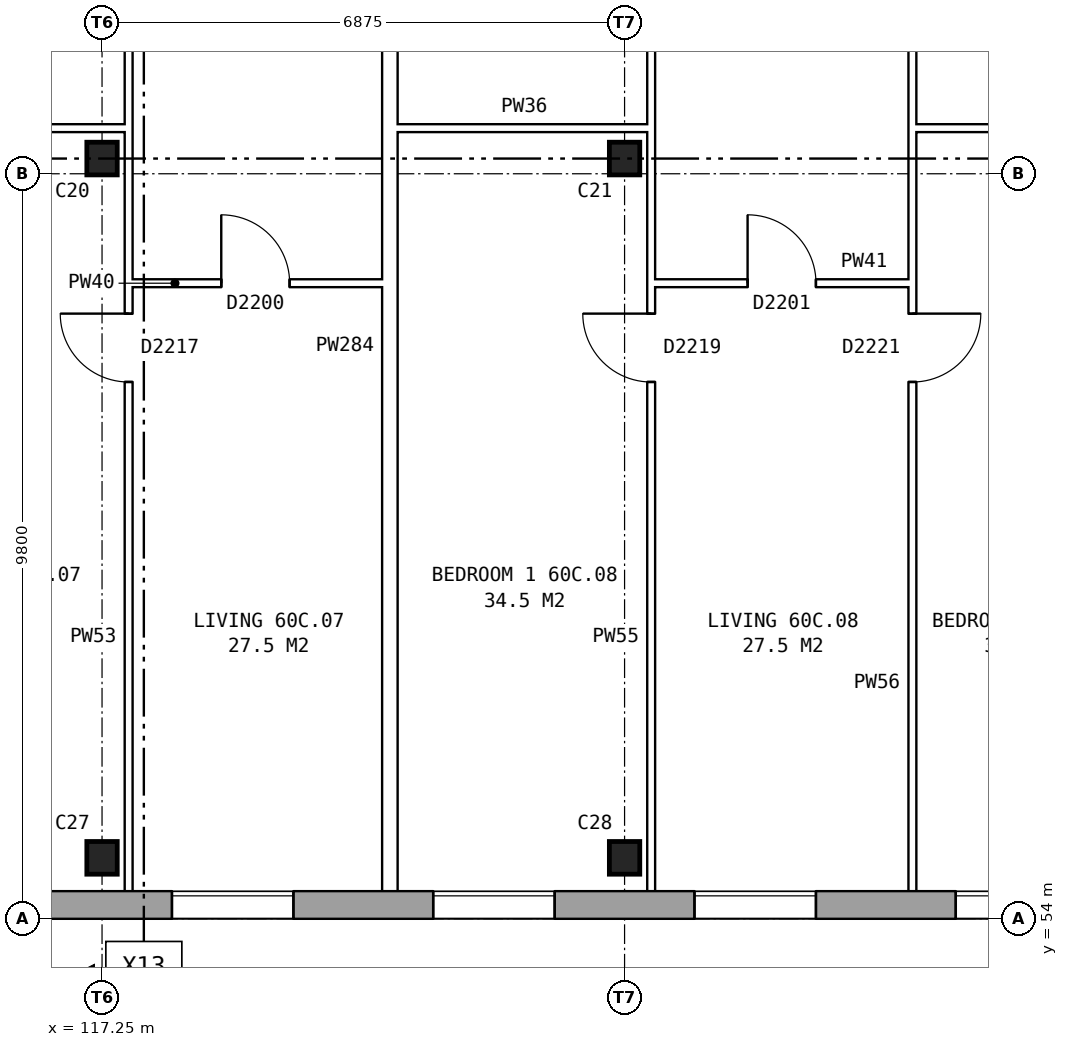
"""IFC4 building model, lengths in metres.
Left out: names, types, materials, properties, quantities, classifications, styles, units other than length and angle.
Written with IfcOpenShell. Run it as: python <this file> out.ifc"""

import sys

from ifc_helpers import new_model, si_unit, direction, frame, frame_2d, origin, origin_2d, place, context, subcontext, project, spatial, rectangle, i_section, extrude, element, fill, save


model = new_model("IFC4")
c1 = context("Model", 3, precision=1e-05, world=origin(), true_north=direction((0.0, 1.0)))
c2 = subcontext(c1, "Body", "Model", "MODEL_VIEW")
j1 = project(units=[si_unit("LENGTHUNIT", "METRE"), si_unit("PLANEANGLEUNIT", "RADIAN")], contexts=[c1])
p1 = place(None, origin())
s1 = spatial("IfcSite", under=j1, at=p1, CompositionType="ELEMENT")
p2 = place(p1, origin())
s2 = spatial("IfcBuilding", under=s1, at=p2, CompositionType="ELEMENT")
p3 = place(p2, frame((0.0, 0.0, 212.1)))
s3 = spatial("IfcBuildingStorey", under=s2, at=p3, CompositionType="ELEMENT", Elevation=212.1)
for number, where, z_axis, x_axis in (
    (1, (117.25, 54.8, 0.0), (0.0, 0.0, 1.0), (1.0, 0.0, 0.0)),
    (2, (124.125, 54.8, 0.0), (0.0, 0.0, 1.0), (1.0, 0.0, 0.0)),
    (3, (117.25, 64.0, 0.0), (0.0, 0.0, 1.0), (1.0, 0.0, 0.0)),
    (4, (124.125, 64.0, 0.0), (0.0, 0.0, 1.0), (1.0, 0.0, 0.0)),
):
    element("IfcColumn", number, at=place(p3, frame(where, z_axis=z_axis, x_axis=x_axis)), inside=s3, PredefinedType="COLUMN", context=c2, shape_type="SweptSolid", body=[
        extrude(i_section(OverallWidth=0.4, OverallDepth=0.43, WebThickness=0.04, FlangeThickness=0.04, at=origin_2d()), origin(), (0.0, 0.0, 1.0), 2.85),
    ])
p4 = place(p3, frame((75.95, 54.18, 0.0), z_axis=(0.0, 0.0, 1.0), x_axis=(1.0, 0.0, 0.0)))
e5 = element("IfcWall", 5, at=p4, inside=s3, PredefinedType="STANDARD", context=c2, shape_type="SweptSolid", body=[
    extrude(rectangle(XDim=55.1, YDim=0.36, at=frame_2d((27.55, 0.0))), origin(), (0.0, 0.0, 1.0), 2.85),
])
p5 = place(p4, frame((0.969, 0.0, 0.8)))
e6 = element("IfcOpeningElement", 6, at=p5, cuts=e5, PredefinedType="OPENING", context=c2, shape_type="SweptSolid", body=[
    extrude(rectangle(XDim=1.6, YDim=1.8, at=frame_2d((0.8, 0.9))), frame((0.0, 0.19, 0.0), z_axis=(0.0, -1.0, 0.0), x_axis=(1.0, 0.0, 0.0)), (0.0, 0.0, 1.0), 0.38),
])
p6 = place(p4, frame((4.406, 0.0, 0.8)))
e7 = element("IfcOpeningElement", 7, at=p6, cuts=e5, PredefinedType="OPENING", context=c2, shape_type="SweptSolid", body=[
    extrude(rectangle(XDim=1.6, YDim=1.8, at=frame_2d((0.8, 0.9))), frame((0.0, 0.19, 0.0), z_axis=(0.0, -1.0, 0.0), x_axis=(1.0, 0.0, 0.0)), (0.0, 0.0, 1.0), 0.38),
])
p7 = place(p4, frame((7.844, 0.0, 0.8)))
e8 = element("IfcOpeningElement", 8, at=p7, cuts=e5, PredefinedType="OPENING", context=c2, shape_type="SweptSolid", body=[
    extrude(rectangle(XDim=1.6, YDim=1.8, at=frame_2d((0.8, 0.9))), frame((0.0, 0.19, 0.0), z_axis=(0.0, -1.0, 0.0), x_axis=(1.0, 0.0, 0.0)), (0.0, 0.0, 1.0), 0.38),
])
p8 = place(p4, frame((11.281, 0.0, 0.8)))
e9 = element("IfcOpeningElement", 9, at=p8, cuts=e5, PredefinedType="OPENING", context=c2, shape_type="SweptSolid", body=[
    extrude(rectangle(XDim=1.6, YDim=1.8, at=frame_2d((0.8, 0.9))), frame((0.0, 0.19, 0.0), z_axis=(0.0, -1.0, 0.0), x_axis=(1.0, 0.0, 0.0)), (0.0, 0.0, 1.0), 0.38),
])
p9 = place(p4, frame((14.719, 0.0, 0.8)))
e10 = element("IfcOpeningElement", 10, at=p9, cuts=e5, PredefinedType="OPENING", context=c2, shape_type="SweptSolid", body=[
    extrude(rectangle(XDim=1.6, YDim=1.8, at=frame_2d((0.8, 0.9))), frame((0.0, 0.19, 0.0), z_axis=(0.0, -1.0, 0.0), x_axis=(1.0, 0.0, 0.0)), (0.0, 0.0, 1.0), 0.38),
])
p10 = place(p4, frame((18.156, 0.0, 0.8)))
e11 = element("IfcOpeningElement", 11, at=p10, cuts=e5, PredefinedType="OPENING", context=c2, shape_type="SweptSolid", body=[
    extrude(rectangle(XDim=1.6, YDim=1.8, at=frame_2d((0.8, 0.9))), frame((0.0, 0.19, 0.0), z_axis=(0.0, -1.0, 0.0), x_axis=(1.0, 0.0, 0.0)), (0.0, 0.0, 1.0), 0.38),
])
p11 = place(p4, frame((21.594, 0.0, 0.8)))
e12 = element("IfcOpeningElement", 12, at=p11, cuts=e5, PredefinedType="OPENING", context=c2, shape_type="SweptSolid", body=[
    extrude(rectangle(XDim=1.6, YDim=1.8, at=frame_2d((0.8, 0.9))), frame((0.0, 0.19, 0.0), z_axis=(0.0, -1.0, 0.0), x_axis=(1.0, 0.0, 0.0)), (0.0, 0.0, 1.0), 0.38),
])
p12 = place(p4, frame((25.031, 0.0, 0.8)))
e13 = element("IfcOpeningElement", 13, at=p12, cuts=e5, PredefinedType="OPENING", context=c2, shape_type="SweptSolid", body=[
    extrude(rectangle(XDim=1.6, YDim=1.8, at=frame_2d((0.8, 0.9))), frame((0.0, 0.19, 0.0), z_axis=(0.0, -1.0, 0.0), x_axis=(1.0, 0.0, 0.0)), (0.0, 0.0, 1.0), 0.38),
])
p13 = place(p4, frame((28.469, 0.0, 0.8)))
e14 = element("IfcOpeningElement", 14, at=p13, cuts=e5, PredefinedType="OPENING", context=c2, shape_type="SweptSolid", body=[
    extrude(rectangle(XDim=1.6, YDim=1.8, at=frame_2d((0.8, 0.9))), frame((0.0, 0.19, 0.0), z_axis=(0.0, -1.0, 0.0), x_axis=(1.0, 0.0, 0.0)), (0.0, 0.0, 1.0), 0.38),
])
p14 = place(p4, frame((31.906, 0.0, 0.8)))
e15 = element("IfcOpeningElement", 15, at=p14, cuts=e5, PredefinedType="OPENING", context=c2, shape_type="SweptSolid", body=[
    extrude(rectangle(XDim=1.6, YDim=1.8, at=frame_2d((0.8, 0.9))), frame((0.0, 0.19, 0.0), z_axis=(0.0, -1.0, 0.0), x_axis=(1.0, 0.0, 0.0)), (0.0, 0.0, 1.0), 0.38),
])
p15 = place(p4, frame((35.344, 0.0, 0.8)))
e16 = element("IfcOpeningElement", 16, at=p15, cuts=e5, PredefinedType="OPENING", context=c2, shape_type="SweptSolid", body=[
    extrude(rectangle(XDim=1.6, YDim=1.8, at=frame_2d((0.8, 0.9))), frame((0.0, 0.19, 0.0), z_axis=(0.0, -1.0, 0.0), x_axis=(1.0, 0.0, 0.0)), (0.0, 0.0, 1.0), 0.38),
])
p16 = place(p4, frame((38.781, 0.0, 0.8)))
e17 = element("IfcOpeningElement", 17, at=p16, cuts=e5, PredefinedType="OPENING", context=c2, shape_type="SweptSolid", body=[
    extrude(rectangle(XDim=1.6, YDim=1.8, at=frame_2d((0.8, 0.9))), frame((0.0, 0.19, 0.0), z_axis=(0.0, -1.0, 0.0), x_axis=(1.0, 0.0, 0.0)), (0.0, 0.0, 1.0), 0.38),
])
p17 = place(p4, frame((42.219, 0.0, 0.8)))
e18 = element("IfcOpeningElement", 18, at=p17, cuts=e5, PredefinedType="OPENING", context=c2, shape_type="SweptSolid", body=[
    extrude(rectangle(XDim=1.6, YDim=1.8, at=frame_2d((0.8, 0.9))), frame((0.0, 0.19, 0.0), z_axis=(0.0, -1.0, 0.0), x_axis=(1.0, 0.0, 0.0)), (0.0, 0.0, 1.0), 0.38),
])
p18 = place(p4, frame((45.656, 0.0, 0.8)))
e19 = element("IfcOpeningElement", 19, at=p18, cuts=e5, PredefinedType="OPENING", context=c2, shape_type="SweptSolid", body=[
    extrude(rectangle(XDim=1.6, YDim=1.8, at=frame_2d((0.8, 0.9))), frame((0.0, 0.19, 0.0), z_axis=(0.0, -1.0, 0.0), x_axis=(1.0, 0.0, 0.0)), (0.0, 0.0, 1.0), 0.38),
])
p19 = place(p4, frame((49.094, 0.0, 0.8)))
e20 = element("IfcOpeningElement", 20, at=p19, cuts=e5, PredefinedType="OPENING", context=c2, shape_type="SweptSolid", body=[
    extrude(rectangle(XDim=1.6, YDim=1.8, at=frame_2d((0.8, 0.9))), frame((0.0, 0.19, 0.0), z_axis=(0.0, -1.0, 0.0), x_axis=(1.0, 0.0, 0.0)), (0.0, 0.0, 1.0), 0.38),
])
p20 = place(p4, frame((52.531, 0.0, 0.8)))
e21 = element("IfcOpeningElement", 21, at=p20, cuts=e5, PredefinedType="OPENING", context=c2, shape_type="SweptSolid", body=[
    extrude(rectangle(XDim=1.6, YDim=1.8, at=frame_2d((0.8, 0.9))), frame((0.0, 0.19, 0.0), z_axis=(0.0, -1.0, 0.0), x_axis=(1.0, 0.0, 0.0)), (0.0, 0.0, 1.0), 0.38),
])
p21 = place(p3, frame((117.6, 62.36, 0.0), z_axis=(0.0, 0.0, 1.0), x_axis=(1.0, 0.0, 0.0)))
e22 = element("IfcWall", 22, at=p21, inside=s3, PredefinedType="PARTITIONING", context=c2, shape_type="SweptSolid", body=[
    extrude(rectangle(XDim=3.337, YDim=0.1, at=frame_2d((1.668, 0.0))), origin(), (0.0, 0.0, 1.0), 2.85),
])
p22 = place(p21, frame((1.219, 0.0, 0.0)))
e23 = element("IfcOpeningElement", 23, at=p22, cuts=e22, PredefinedType="OPENING", context=c2, shape_type="SweptSolid", body=[
    extrude(rectangle(XDim=0.9, YDim=2.1, at=frame_2d((0.45, 1.05))), frame((0.0, 0.06, 0.0), z_axis=(0.0, -1.0, 0.0), x_axis=(1.0, 0.0, 0.0)), (0.0, 0.0, 1.0), 0.12),
])
p23 = place(p3, frame((124.475, 62.36, 0.0), z_axis=(0.0, 0.0, 1.0), x_axis=(1.0, 0.0, 0.0)))
e24 = element("IfcWall", 24, at=p23, inside=s3, PredefinedType="PARTITIONING", context=c2, shape_type="SweptSolid", body=[
    extrude(rectangle(XDim=3.437, YDim=0.1, at=frame_2d((1.719, 0.0))), origin(), (0.0, 0.0, 1.0), 2.85),
])
p24 = place(p23, frame((1.269, 0.0, 0.0)))
e25 = element("IfcOpeningElement", 25, at=p24, cuts=e24, PredefinedType="OPENING", context=c2, shape_type="SweptSolid", body=[
    extrude(rectangle(XDim=0.9, YDim=2.1, at=frame_2d((0.45, 1.05))), frame((0.0, 0.06, 0.0), z_axis=(0.0, -1.0, 0.0), x_axis=(1.0, 0.0, 0.0)), (0.0, 0.0, 1.0), 0.12),
])
for number, where, z_axis, x_axis in (
    (26, (114.262, 64.4, 0.0), (0.0, 0.0, 1.0), (1.0, 0.0, 0.0)),
    (27, (121.137, 64.4, 0.0), (0.0, 0.0, 1.0), (1.0, 0.0, 0.0)),
):
    element("IfcWall", number, at=place(p3, frame(where, z_axis=z_axis, x_axis=x_axis)), inside=s3, PredefinedType="PARTITIONING", context=c2, shape_type="SweptSolid", body=[
        extrude(rectangle(XDim=3.338, YDim=0.1, at=frame_2d((1.669, 0.0))), origin(), (0.0, 0.0, 1.0), 2.85),
    ])
p25 = place(p3, frame((127.912, 64.4, 0.0), z_axis=(0.0, 0.0, 1.0), x_axis=(1.0, 0.0, 0.0)))
e28 = element("IfcWall", 28, at=p25, inside=s3, PredefinedType="PARTITIONING", context=c2, shape_type="SweptSolid", body=[
    extrude(rectangle(XDim=3.448, YDim=0.1, at=frame_2d((1.724, 0.0))), origin(), (0.0, 0.0, 1.0), 2.85),
])
p26 = place(p3, frame((117.6, 54.36, 0.0), z_axis=(0.0, 0.0, 1.0), x_axis=(0.0, 1.0, 0.0)))
e29 = element("IfcWall", 29, at=p26, inside=s3, PredefinedType="PARTITIONING", context=c2, shape_type="SweptSolid", body=[
    extrude(rectangle(XDim=14.34, YDim=0.1, at=frame_2d((7.17, 0.0))), origin(), (0.0, 0.0, 1.0), 2.85),
])
p27 = place(p26, frame((6.7, 0.0, 0.0)))
e30 = element("IfcOpeningElement", 30, at=p27, cuts=e29, PredefinedType="OPENING", context=c2, shape_type="SweptSolid", body=[
    extrude(rectangle(XDim=0.9, YDim=2.1, at=frame_2d((0.45, 1.05))), frame((0.0, 0.06, 0.0), z_axis=(0.0, -1.0, 0.0), x_axis=(1.0, 0.0, 0.0)), (0.0, 0.0, 1.0), 0.12),
])
p28 = place(p26, frame((13.04, 0.0, 0.0)))
e31 = element("IfcOpeningElement", 31, at=p28, cuts=e29, PredefinedType="OPENING", context=c2, shape_type="SweptSolid", body=[
    extrude(rectangle(XDim=0.9, YDim=2.1, at=frame_2d((0.45, 1.05))), frame((0.0, 0.06, 0.0), z_axis=(0.0, -1.0, 0.0), x_axis=(1.0, 0.0, 0.0)), (0.0, 0.0, 1.0), 0.12),
])
p29 = place(p3, frame((121.037, 54.36, 0.0), z_axis=(0.0, 0.0, 1.0), x_axis=(0.0, 1.0, 0.0)))
e32 = element("IfcWall", 32, at=p29, inside=s3, PredefinedType="PARTITIONING", context=c2, shape_type="SweptSolid", body=[
    extrude(rectangle(XDim=14.34, YDim=0.2, at=frame_2d((7.17, 0.0))), origin(), (0.0, 0.0, 1.0), 2.85),
])
p30 = place(p3, frame((124.475, 54.36, 0.0), z_axis=(0.0, 0.0, 1.0), x_axis=(0.0, 1.0, 0.0)))
e33 = element("IfcWall", 33, at=p30, inside=s3, PredefinedType="PARTITIONING", context=c2, shape_type="SweptSolid", body=[
    extrude(rectangle(XDim=14.34, YDim=0.1, at=frame_2d((7.17, 0.0))), origin(), (0.0, 0.0, 1.0), 2.85),
])
p31 = place(p30, frame((6.7, 0.0, 0.0)))
e34 = element("IfcOpeningElement", 34, at=p31, cuts=e33, PredefinedType="OPENING", context=c2, shape_type="SweptSolid", body=[
    extrude(rectangle(XDim=0.9, YDim=2.1, at=frame_2d((0.45, 1.05))), frame((0.0, 0.06, 0.0), z_axis=(0.0, -1.0, 0.0), x_axis=(1.0, 0.0, 0.0)), (0.0, 0.0, 1.0), 0.12),
])
p32 = place(p30, frame((13.04, 0.0, 0.0)))
e35 = element("IfcOpeningElement", 35, at=p32, cuts=e33, PredefinedType="OPENING", context=c2, shape_type="SweptSolid", body=[
    extrude(rectangle(XDim=0.9, YDim=2.1, at=frame_2d((0.45, 1.05))), frame((0.0, 0.06, 0.0), z_axis=(0.0, -1.0, 0.0), x_axis=(1.0, 0.0, 0.0)), (0.0, 0.0, 1.0), 0.12),
])
p33 = place(p3, frame((127.912, 54.36, 0.0), z_axis=(0.0, 0.0, 1.0), x_axis=(0.0, 1.0, 0.0)))
e36 = element("IfcWall", 36, at=p33, inside=s3, PredefinedType="PARTITIONING", context=c2, shape_type="SweptSolid", body=[
    extrude(rectangle(XDim=14.34, YDim=0.1, at=frame_2d((7.17, 0.0))), origin(), (0.0, 0.0, 1.0), 2.85),
])
p34 = place(p33, frame((6.7, 0.0, 0.0)))
e37 = element("IfcOpeningElement", 37, at=p34, cuts=e36, PredefinedType="OPENING", context=c2, shape_type="SweptSolid", body=[
    extrude(rectangle(XDim=0.9, YDim=2.1, at=frame_2d((0.45, 1.05))), frame((0.0, 0.06, 0.0), z_axis=(0.0, -1.0, 0.0), x_axis=(1.0, 0.0, 0.0)), (0.0, 0.0, 1.0), 0.12),
])
p35 = place(p33, frame((13.04, 0.0, 0.0)))
e38 = element("IfcOpeningElement", 38, at=p35, cuts=e36, PredefinedType="OPENING", context=c2, shape_type="SweptSolid", body=[
    extrude(rectangle(XDim=0.9, YDim=2.1, at=frame_2d((0.45, 1.05))), frame((0.0, 0.06, 0.0), z_axis=(0.0, -1.0, 0.0), x_axis=(1.0, 0.0, 0.0)), (0.0, 0.0, 1.0), 0.12),
])
p36 = place(p17, origin())
e39 = element("IfcWindow", 39, at=p36, inside=s3, PartitioningType="SINGLE_PANEL", PredefinedType="WINDOW", context=c2, shape_type="SweptSolid", body=[
    extrude(rectangle(XDim=1.6, YDim=1.8, at=frame_2d((0.8, 0.9))), frame((0.0, 0.15, 0.0), z_axis=(0.0, -1.0, 0.0), x_axis=(1.0, 0.0, 0.0)), (0.0, 0.0, 1.0), 0.06),
])
fill(e18, e39)
p37 = place(p18, origin())
e40 = element("IfcWindow", 40, at=p37, inside=s3, PartitioningType="SINGLE_PANEL", PredefinedType="WINDOW", context=c2, shape_type="SweptSolid", body=[
    extrude(rectangle(XDim=1.6, YDim=1.8, at=frame_2d((0.8, 0.9))), frame((0.0, 0.15, 0.0), z_axis=(0.0, -1.0, 0.0), x_axis=(1.0, 0.0, 0.0)), (0.0, 0.0, 1.0), 0.06),
])
fill(e19, e40)
p38 = place(p19, origin())
e41 = element("IfcWindow", 41, at=p38, inside=s3, PartitioningType="SINGLE_PANEL", PredefinedType="WINDOW", context=c2, shape_type="SweptSolid", body=[
    extrude(rectangle(XDim=1.6, YDim=1.8, at=frame_2d((0.8, 0.9))), frame((0.0, 0.15, 0.0), z_axis=(0.0, -1.0, 0.0), x_axis=(1.0, 0.0, 0.0)), (0.0, 0.0, 1.0), 0.06),
])
fill(e20, e41)
p39 = place(p20, origin())
e42 = element("IfcWindow", 42, at=p39, inside=s3, PartitioningType="SINGLE_PANEL", PredefinedType="WINDOW", context=c2, shape_type="SweptSolid", body=[
    extrude(rectangle(XDim=1.6, YDim=1.8, at=frame_2d((0.8, 0.9))), frame((0.0, 0.15, 0.0), z_axis=(0.0, -1.0, 0.0), x_axis=(1.0, 0.0, 0.0)), (0.0, 0.0, 1.0), 0.06),
])
fill(e21, e42)
p40 = place(p27, origin())
e43 = element("IfcDoor", 43, at=p40, inside=s3, OperationType="SINGLE_SWING_RIGHT", PredefinedType="DOOR", context=c2, shape_type="SweptSolid", body=[
    extrude(rectangle(XDim=0.9, YDim=2.1, at=frame_2d((0.45, 1.05))), frame((0.0, 0.025, 0.0), z_axis=(0.0, -1.0, 0.0), x_axis=(1.0, 0.0, 0.0)), (0.0, 0.0, 1.0), 0.05),
])
fill(e30, e43)
p41 = place(p22, origin())
e44 = element("IfcDoor", 44, at=p41, inside=s3, OperationType="SINGLE_SWING_LEFT", PredefinedType="DOOR", context=c2, shape_type="SweptSolid", body=[
    extrude(rectangle(XDim=0.9, YDim=2.1, at=frame_2d((0.45, 1.05))), frame((0.0, 0.025, 0.0), z_axis=(0.0, -1.0, 0.0), x_axis=(1.0, 0.0, 0.0)), (0.0, 0.0, 1.0), 0.05),
])
fill(e23, e44)
p42 = place(p31, origin())
e45 = element("IfcDoor", 45, at=p42, inside=s3, OperationType="SINGLE_SWING_RIGHT", PredefinedType="DOOR", context=c2, shape_type="SweptSolid", body=[
    extrude(rectangle(XDim=0.9, YDim=2.1, at=frame_2d((0.45, 1.05))), frame((0.0, 0.025, 0.0), z_axis=(0.0, -1.0, 0.0), x_axis=(1.0, 0.0, 0.0)), (0.0, 0.0, 1.0), 0.05),
])
fill(e34, e45)
p43 = place(p34, frame((0.9, 0.0, 0.0), z_axis=(0.0, 0.0, 1.0), x_axis=(-1.0, 0.0, 0.0)))
e46 = element("IfcDoor", 46, at=p43, inside=s3, OperationType="SINGLE_SWING_LEFT", PredefinedType="DOOR", context=c2, shape_type="SweptSolid", body=[
    extrude(rectangle(XDim=0.9, YDim=2.1, at=frame_2d((0.45, 1.05))), frame((0.0, 0.025, 0.0), z_axis=(0.0, -1.0, 0.0), x_axis=(1.0, 0.0, 0.0)), (0.0, 0.0, 1.0), 0.05),
])
fill(e37, e46)
p44 = place(p24, origin())
e47 = element("IfcDoor", 47, at=p44, inside=s3, OperationType="SINGLE_SWING_LEFT", PredefinedType="DOOR", context=c2, shape_type="SweptSolid", body=[
    extrude(rectangle(XDim=0.9, YDim=2.1, at=frame_2d((0.45, 1.05))), frame((0.0, 0.025, 0.0), z_axis=(0.0, -1.0, 0.0), x_axis=(1.0, 0.0, 0.0)), (0.0, 0.0, 1.0), 0.05),
])
fill(e25, e47)
save(model, sys.argv[1])
